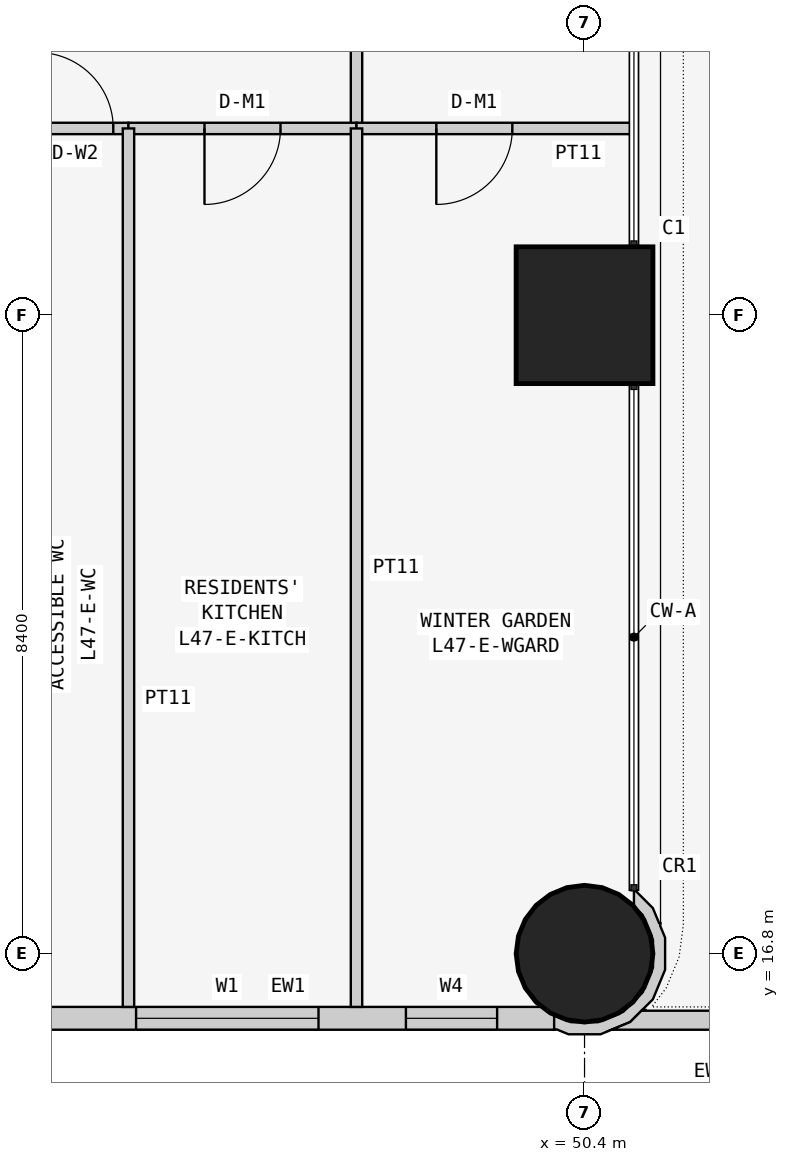
"""IFC4 building model, lengths in metres.
Left out: names, types, materials, properties, quantities, classifications, styles, units other than length and angle.
Written with IfcOpenShell. Run it as: python <this file> out.ifc"""

import sys

from ifc_helpers import new_model, si_unit, direction, frame, frame_2d, origin, origin_2d, place, context, subcontext, project, spatial, polyline, rectangle, circle, outline, extrude, element, fill, save


model = new_model("IFC4")
c1 = context("Model", 3, precision=1e-05, world=origin(), true_north=direction((0.0, 1.0)))
c2 = subcontext(c1, "Body", "Model", "MODEL_VIEW")
j1 = project(units=[si_unit("LENGTHUNIT", "METRE"), si_unit("PLANEANGLEUNIT", "RADIAN")], contexts=[c1])
p1 = place(None, origin())
s1 = spatial("IfcSite", under=j1, at=p1, CompositionType="ELEMENT")
p2 = place(p1, origin())
s2 = spatial("IfcBuilding", under=s1, at=p2, CompositionType="ELEMENT")
p3 = place(p2, frame((0.0, 0.0, 183.3)))
s3 = spatial("IfcBuildingStorey", under=s2, at=p3, CompositionType="ELEMENT", Elevation=183.3)
p4 = place(p3, frame((50.4, 16.8, 0.0), z_axis=(0.0, 0.0, 1.0), x_axis=(1.0, 0.0, 0.0)))
e1 = element("IfcColumn", 1, at=p4, inside=s3, PredefinedType="COLUMN", context=c2, shape_type="SweptSolid", body=[
    extrude(circle(Radius=0.9, at=origin_2d()), origin(), (0.0, 0.0, 1.0), 3.6),
])
p5 = place(p3, frame((50.4, 25.2, 0.0), z_axis=(0.0, 0.0, 1.0), x_axis=(1.0, 0.0, 0.0)))
e2 = element("IfcColumn", 2, at=p5, inside=s3, PredefinedType="COLUMN", context=c2, shape_type="SweptSolid", body=[
    extrude(rectangle(XDim=1.8, YDim=1.8, at=origin_2d()), origin(), (0.0, 0.0, 1.0), 3.6),
])
p6 = place(p3, frame((43.0, 15.95, 0.0), z_axis=(0.0, 0.0, 1.0), x_axis=(1.0, 0.0, 0.0)))
e3 = element("IfcWall", 3, at=p6, inside=s3, PredefinedType="SOLIDWALL", context=c2, shape_type="SweptSolid", body=[
    extrude(rectangle(XDim=7.0, YDim=0.3, at=frame_2d((3.5, 0.0))), origin(), (0.0, 0.0, 1.0), 3.45),
])
p7 = place(p6, frame((1.5, 0.0, 0.9)))
e4 = element("IfcOpeningElement", 4, at=p7, cuts=e3, PredefinedType="OPENING", context=c2, shape_type="SweptSolid", body=[
    extrude(rectangle(XDim=2.4, YDim=1.5, at=frame_2d((1.2, 0.75))), frame((0.0, 0.16, 0.0), z_axis=(0.0, -1.0, 0.0), x_axis=(1.0, 0.0, 0.0)), (0.0, 0.0, 1.0), 0.32),
])
p8 = place(p6, frame((5.05, 0.0, 0.9)))
e5 = element("IfcOpeningElement", 5, at=p8, cuts=e3, PredefinedType="OPENING", context=c2, shape_type="SweptSolid", body=[
    extrude(rectangle(XDim=1.2, YDim=1.5, at=frame_2d((0.6, 0.75))), frame((0.0, 0.16, 0.0), z_axis=(0.0, -1.0, 0.0), x_axis=(1.0, 0.0, 0.0)), (0.0, 0.0, 1.0), 0.32),
])
p9 = place(p3, frame((50.036, 15.89, 0.0), z_axis=(0.0, 0.0, 1.0), x_axis=(0.926129809145, -0.377204953059, 0.0)))
e6 = element("IfcWall", 6, at=p9, inside=s3, PredefinedType="SOLIDWALL", context=c2, shape_type="SweptSolid", body=[
    extrude(outline(polyline([(0.769, 1.728), (0.75, 1.723), (0.6, 1.875), (0.295, 2.004), (0.281, 1.998), (0.36, 1.803), (0.509, 1.741), (0.761, 1.486), (0.896, 1.154), (0.894, 0.795), (0.755, 0.465), (0.5, 0.213), (0.168, 0.078), (-0.1, 0.08), (0.001, -0.097), (0.03, -0.08), (0.198, -0.081), (0.589, 0.078), (0.889, 0.374), (1.052, 0.763), (1.055, 1.184), (0.896, 1.575), (0.778, 1.695), (0.769, 1.728)])), origin(), (0.0, 0.0, 1.0), 3.45),
])
p10 = place(p3, origin())
e7 = element("IfcWall", 7, at=p10, inside=s3, PredefinedType="PARAPET", context=c2, shape_type="SweptSolid", body=[
    extrude(outline(polyline([(59.1, 42.812), (59.39, 42.59), (59.612, 42.3), (59.752, 41.962), (59.8, 41.6), (59.8, 17.2), (59.752, 16.838), (59.612, 16.5), (59.39, 16.21), (59.1, 15.988), (58.762, 15.848), (58.4, 15.8), (50.756, 15.8), (51.0, 15.901), (51.159, 16.06), (51.19, 16.06), (51.182, 16.05), (58.384, 16.05), (58.697, 16.091), (58.974, 16.206), (59.212, 16.388), (59.394, 16.626), (59.509, 16.903), (59.55, 17.216), (59.55, 41.583), (59.509, 41.897), (59.394, 42.174), (59.212, 42.412), (58.974, 42.594), (58.697, 42.709), (58.384, 42.75), (51.182, 42.75), (51.19, 42.74), (51.159, 42.74), (51.0, 42.899), (50.756, 43.0), (58.4, 43.0), (58.762, 42.952), (59.1, 42.812)])), origin(), (0.0, 0.0, 1.0), 1.25),
])
p11 = place(p3, frame((47.4, 27.657, 0.0), z_axis=(0.0, 0.0, 1.0), x_axis=(0.0, 1.0, 0.0)))
e8 = element("IfcWall", 8, at=p11, inside=s3, PredefinedType="PARTITIONING", context=c2, shape_type="SweptSolid", body=[
    extrude(rectangle(XDim=3.486, YDim=0.15, at=frame_2d((1.743, 0.0))), origin(), (0.0, 0.0, 1.0), 3.45),
])
p12 = place(p3, frame((42.975, 27.657, 0.0), z_axis=(0.0, 0.0, 1.0), x_axis=(1.0, 0.0, 0.0)))
e9 = element("IfcWall", 9, at=p12, inside=s3, PredefinedType="PARTITIONING", context=c2, shape_type="SweptSolid", body=[
    extrude(rectangle(XDim=1.425, YDim=0.15, at=frame_2d((0.712, 0.0))), origin(), (0.0, 0.0, 1.0), 3.45),
])
p13 = place(p12, frame((0.225, 0.0, 0.0)))
e10 = element("IfcOpeningElement", 10, at=p13, cuts=e9, PredefinedType="OPENING", context=c2, shape_type="SweptSolid", body=[
    extrude(rectangle(XDim=1.0, YDim=2.1, at=frame_2d((0.5, 1.05))), frame((0.0, 0.085, 0.0), z_axis=(0.0, -1.0, 0.0), x_axis=(1.0, 0.0, 0.0)), (0.0, 0.0, 1.0), 0.17),
])
p14 = place(p3, frame((44.4, 27.657, 0.0), z_axis=(0.0, 0.0, 1.0), x_axis=(1.0, 0.0, 0.0)))
e11 = element("IfcWall", 11, at=p14, inside=s3, PredefinedType="PARTITIONING", context=c2, shape_type="SweptSolid", body=[
    extrude(rectangle(XDim=3.0, YDim=0.15, at=frame_2d((1.5, 0.0))), origin(), (0.0, 0.0, 1.0), 3.45),
])
p15 = place(p14, frame((1.0, 0.0, 0.0)))
e12 = element("IfcOpeningElement", 12, at=p15, cuts=e11, PredefinedType="OPENING", context=c2, shape_type="SweptSolid", body=[
    extrude(rectangle(XDim=1.0, YDim=2.1, at=frame_2d((0.5, 1.05))), frame((0.0, 0.085, 0.0), z_axis=(0.0, -1.0, 0.0), x_axis=(1.0, 0.0, 0.0)), (0.0, 0.0, 1.0), 0.17),
])
p16 = place(p3, frame((51.05, 27.657, 0.0), z_axis=(0.0, 0.0, 1.0), x_axis=(-1.0, 0.0, 0.0)))
e13 = element("IfcWall", 13, at=p16, inside=s3, PredefinedType="PARTITIONING", context=c2, shape_type="SweptSolid", body=[
    extrude(rectangle(XDim=3.65, YDim=0.15, at=frame_2d((1.825, 0.0))), origin(), (0.0, 0.0, 1.0), 3.45),
])
p17 = place(p16, frame((1.6, 0.0, 0.0)))
e14 = element("IfcOpeningElement", 14, at=p17, cuts=e13, PredefinedType="OPENING", context=c2, shape_type="SweptSolid", body=[
    extrude(rectangle(XDim=1.0, YDim=2.1, at=frame_2d((0.5, 1.05))), frame((0.0, 0.085, 0.0), z_axis=(0.0, -1.0, 0.0), x_axis=(1.0, 0.0, 0.0)), (0.0, 0.0, 1.0), 0.17),
])
for number, where, z_axis, x_axis in (
    (15, (44.4, 16.1, 0.0), (0.0, 0.0, 1.0), (0.0, 1.0, 0.0)),
    (16, (47.4, 16.1, 0.0), (0.0, 0.0, 1.0), (0.0, 1.0, 0.0)),
):
    element("IfcWall", number, at=place(p3, frame(where, z_axis=z_axis, x_axis=x_axis)), inside=s3, PredefinedType="PARTITIONING", context=c2, shape_type="SweptSolid", body=[
        extrude(rectangle(XDim=11.557, YDim=0.15, at=frame_2d((5.778, 0.0))), origin(), (0.0, 0.0, 1.0), 3.45),
    ])
p18 = place(p7, origin())
e17 = element("IfcWindow", 17, at=p18, inside=s3, PartitioningType="SINGLE_PANEL", PredefinedType="WINDOW", context=c2, shape_type="SweptSolid", body=[
    extrude(rectangle(XDim=2.4, YDim=1.5, at=frame_2d((1.2, 0.75))), frame((0.0, 0.03, 0.0), z_axis=(0.0, -1.0, 0.0), x_axis=(1.0, 0.0, 0.0)), (0.0, 0.0, 1.0), 0.06),
])
fill(e4, e17)
p19 = place(p8, origin())
e18 = element("IfcWindow", 18, at=p19, inside=s3, PartitioningType="SINGLE_PANEL", PredefinedType="WINDOW", context=c2, shape_type="SweptSolid", body=[
    extrude(rectangle(XDim=1.2, YDim=1.5, at=frame_2d((0.6, 0.75))), frame((0.0, 0.03, 0.0), z_axis=(0.0, -1.0, 0.0), x_axis=(1.0, 0.0, 0.0)), (0.0, 0.0, 1.0), 0.06),
])
fill(e5, e18)
p20 = place(p13, origin())
e19 = element("IfcDoor", 19, at=p20, inside=s3, OperationType="SINGLE_SWING_LEFT", PredefinedType="DOOR", context=c2, shape_type="SweptSolid", body=[
    extrude(rectangle(XDim=1.0, YDim=2.1, at=frame_2d((0.5, 1.05))), frame((0.0, 0.025, 0.0), z_axis=(0.0, -1.0, 0.0), x_axis=(1.0, 0.0, 0.0)), (0.0, 0.0, 1.0), 0.05),
])
fill(e10, e19)
p21 = place(p15, frame((1.0, 0.0, 0.0), z_axis=(0.0, 0.0, 1.0), x_axis=(-1.0, 0.0, 0.0)))
e20 = element("IfcDoor", 20, at=p21, inside=s3, OperationType="SINGLE_SWING_RIGHT", PredefinedType="DOOR", context=c2, shape_type="SweptSolid", body=[
    extrude(rectangle(XDim=1.0, YDim=2.1, at=frame_2d((0.5, 1.05))), frame((0.0, 0.025, 0.0), z_axis=(0.0, -1.0, 0.0), x_axis=(1.0, 0.0, 0.0)), (0.0, 0.0, 1.0), 0.05),
])
fill(e12, e20)
p22 = place(p17, origin())
e21 = element("IfcDoor", 21, at=p22, inside=s3, OperationType="SINGLE_SWING_RIGHT", PredefinedType="DOOR", context=c2, shape_type="SweptSolid", body=[
    extrude(rectangle(XDim=1.0, YDim=2.1, at=frame_2d((0.5, 1.05))), frame((0.0, 0.025, 0.0), z_axis=(0.0, -1.0, 0.0), x_axis=(1.0, 0.0, 0.0)), (0.0, 0.0, 1.0), 0.05),
])
fill(e14, e21)
save(model, sys.argv[1])
